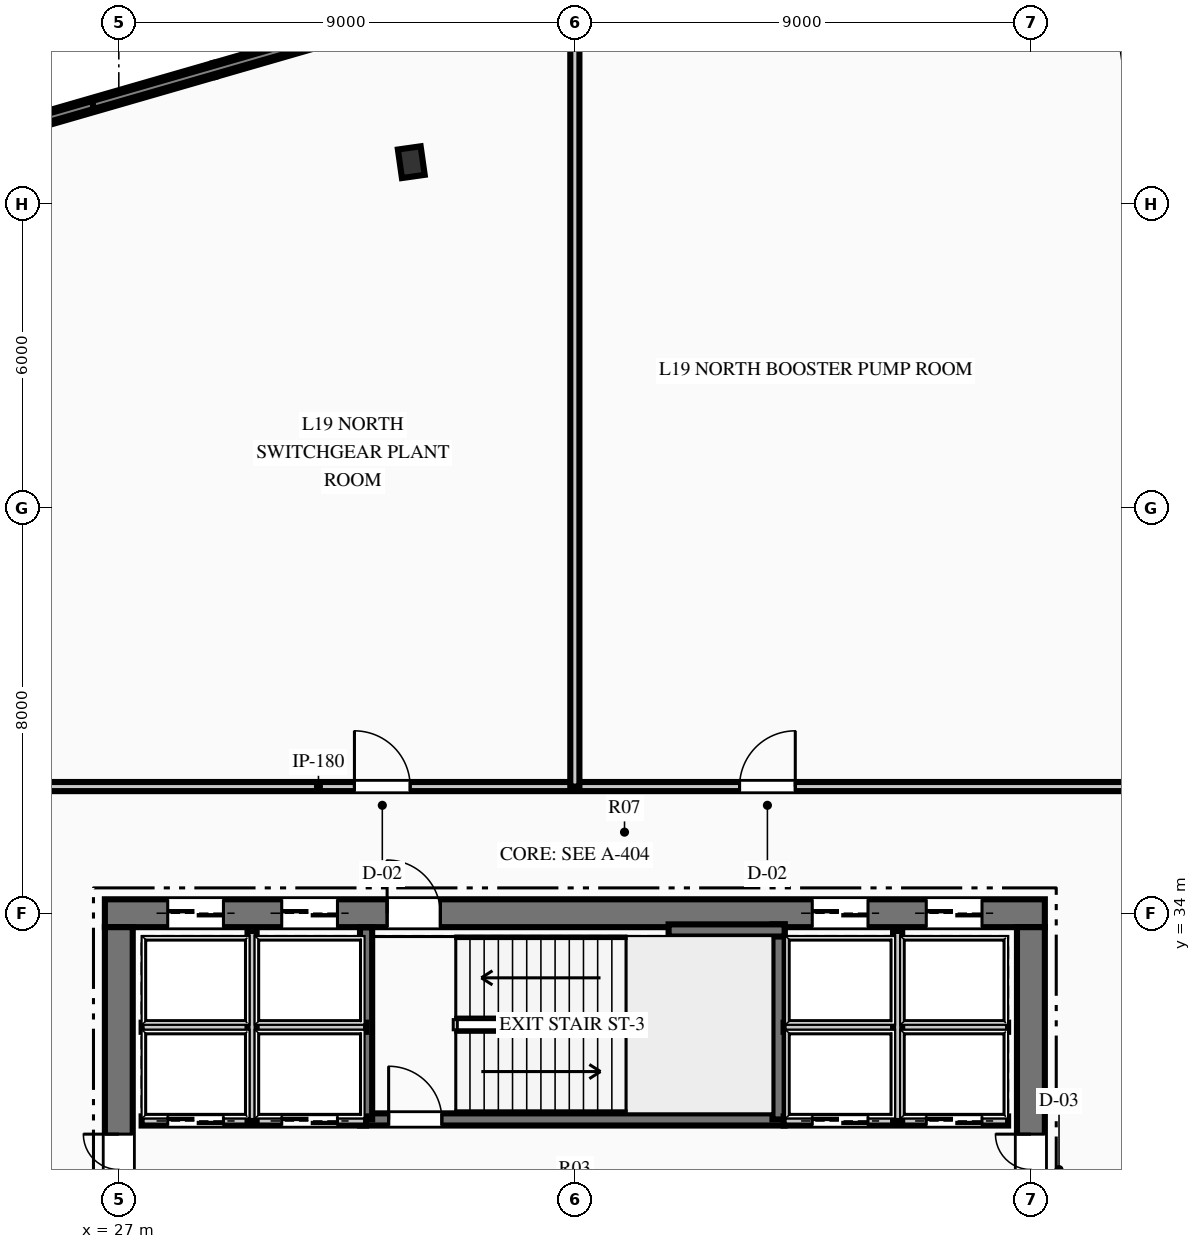
"""IFC4 building model, lengths in metres.
Left out: names, types, materials, properties, quantities, classifications, styles, units other than length and angle.
Written with IfcOpenShell. Run it as: python <this file> out.ifc"""

import sys

from ifc_helpers import new_model, si_unit, direction, frame, frame_2d, origin, origin_2d, place, context, subcontext, project, spatial, rectangle, i_section, extrude, element, fill, save


model = new_model("IFC4")
c1 = context("Model", 3, precision=1e-05, world=origin(), true_north=direction((0.0, 1.0)))
c2 = subcontext(c1, "Body", "Model", "MODEL_VIEW")
j1 = project(units=[si_unit("LENGTHUNIT", "METRE"), si_unit("PLANEANGLEUNIT", "RADIAN")], contexts=[c1])
p1 = place(None, origin())
s1 = spatial("IfcSite", under=j1, at=p1, CompositionType="ELEMENT")
p2 = place(p1, origin())
s2 = spatial("IfcBuilding", under=s1, at=p2, CompositionType="ELEMENT")
p3 = place(p2, frame((0.0, 0.0, 81.45)))
s3 = spatial("IfcBuildingStorey", under=s2, at=p3, CompositionType="ELEMENT", Elevation=81.45)
p4 = place(p3, frame((26.725, 34.0, 0.0), z_axis=(0.0, 0.0, 1.0), x_axis=(1.0, 0.0, 0.0)))
e1 = element("IfcWall", 1, at=p4, inside=s3, PredefinedType="SHEAR", context=c2, shape_type="SweptSolid", body=[
    extrude(rectangle(XDim=18.55, YDim=0.55, at=frame_2d((9.275, 0.0))), origin(), (0.0, 0.0, 1.0), 4.5),
])
p5 = place(p4, frame((5.57, 0.0, 0.0)))
e2 = element("IfcOpeningElement", 2, at=p5, cuts=e1, PredefinedType="OPENING", context=c2, shape_type="SweptSolid", body=[
    extrude(rectangle(XDim=1.05, YDim=2.15, at=frame_2d((0.525, 1.075))), frame((0.0, 0.285, 0.0), z_axis=(0.0, -1.0, 0.0), x_axis=(1.0, 0.0, 0.0)), (0.0, 0.0, 1.0), 0.57),
])
p6 = place(p4, frame((1.24, 0.0, 0.0)))
e3 = element("IfcOpeningElement", 3, at=p6, cuts=e1, PredefinedType="OPENING", context=c2, shape_type="SweptSolid", body=[
    extrude(rectangle(XDim=1.1, YDim=2.15, at=frame_2d((0.55, 1.075))), frame((0.0, 0.285, 0.0), z_axis=(0.0, -1.0, 0.0), x_axis=(1.0, 0.0, 0.0)), (0.0, 0.0, 1.0), 0.57),
])
p7 = place(p4, frame((3.49, 0.0, 0.0)))
e4 = element("IfcOpeningElement", 4, at=p7, cuts=e1, PredefinedType="OPENING", context=c2, shape_type="SweptSolid", body=[
    extrude(rectangle(XDim=1.1, YDim=2.15, at=frame_2d((0.55, 1.075))), frame((0.0, 0.285, 0.0), z_axis=(0.0, -1.0, 0.0), x_axis=(1.0, 0.0, 0.0)), (0.0, 0.0, 1.0), 0.57),
])
p8 = place(p4, frame((13.96, 0.0, 0.0)))
e5 = element("IfcOpeningElement", 5, at=p8, cuts=e1, PredefinedType="OPENING", context=c2, shape_type="SweptSolid", body=[
    extrude(rectangle(XDim=1.1, YDim=2.15, at=frame_2d((0.55, 1.075))), frame((0.0, 0.285, 0.0), z_axis=(0.0, -1.0, 0.0), x_axis=(1.0, 0.0, 0.0)), (0.0, 0.0, 1.0), 0.57),
])
p9 = place(p4, frame((16.21, 0.0, 0.0)))
e6 = element("IfcOpeningElement", 6, at=p9, cuts=e1, PredefinedType="OPENING", context=c2, shape_type="SweptSolid", body=[
    extrude(rectangle(XDim=1.1, YDim=2.15, at=frame_2d((0.55, 1.075))), frame((0.0, 0.285, 0.0), z_axis=(0.0, -1.0, 0.0), x_axis=(1.0, 0.0, 0.0)), (0.0, 0.0, 1.0), 0.57),
])
p10 = place(p3, frame((27.0, 18.275, 0.0), z_axis=(0.0, 0.0, 1.0), x_axis=(0.0, 1.0, 0.0)))
e7 = element("IfcWall", 7, at=p10, inside=s3, PredefinedType="SHEAR", context=c2, shape_type="SweptSolid", body=[
    extrude(rectangle(XDim=15.45, YDim=0.55, at=frame_2d((7.725, 0.0))), origin(), (0.0, 0.0, 1.0), 4.5),
])
p11 = place(p10, frame((9.965, 0.0, 0.0)))
e8 = element("IfcOpeningElement", 8, at=p11, cuts=e7, PredefinedType="OPENING", context=c2, shape_type="SweptSolid", body=[
    extrude(rectangle(XDim=1.4, YDim=2.2, at=frame_2d((0.7, 1.1))), frame((0.0, 0.285, 0.0), z_axis=(0.0, -1.0, 0.0), x_axis=(1.0, 0.0, 0.0)), (0.0, 0.0, 1.0), 0.57),
])
p12 = place(p3, frame((45.0, 18.275, 0.0), z_axis=(0.0, 0.0, 1.0), x_axis=(0.0, 1.0, 0.0)))
e9 = element("IfcWall", 9, at=p12, inside=s3, PredefinedType="SHEAR", context=c2, shape_type="SweptSolid", body=[
    extrude(rectangle(XDim=15.45, YDim=0.55, at=frame_2d((7.725, 0.0))), origin(), (0.0, 0.0, 1.0), 4.5),
])
p13 = place(p12, frame((9.965, 0.0, 0.0)))
e10 = element("IfcOpeningElement", 10, at=p13, cuts=e9, PredefinedType="OPENING", context=c2, shape_type="SweptSolid", body=[
    extrude(rectangle(XDim=1.4, YDim=2.2, at=frame_2d((0.7, 1.1))), frame((0.0, 0.285, 0.0), z_axis=(0.0, -1.0, 0.0), x_axis=(1.0, 0.0, 0.0)), (0.0, 0.0, 1.0), 0.57),
])
p14 = place(p3, frame((31.76, 29.93, 0.0), z_axis=(0.0, 0.0, 1.0), x_axis=(1.0, 0.0, 0.0)))
e11 = element("IfcWall", 11, at=p14, inside=s3, PredefinedType="SHEAR", context=c2, shape_type="SweptSolid", body=[
    extrude(rectangle(XDim=8.38, YDim=0.24, at=frame_2d((4.19, 0.0))), origin(), (0.0, 0.0, 1.0), 4.5),
])
p15 = place(p14, frame((0.565, 0.0, 0.0)))
e12 = element("IfcOpeningElement", 12, at=p15, cuts=e11, PredefinedType="OPENING", context=c2, shape_type="SweptSolid", body=[
    extrude(rectangle(XDim=1.05, YDim=2.15, at=frame_2d((0.525, 1.075))), frame((0.0, 0.13, 0.0), z_axis=(0.0, -1.0, 0.0), x_axis=(1.0, 0.0, 0.0)), (0.0, 0.0, 1.0), 0.26),
])
p16 = place(p3, frame((31.88, 29.93, 0.0), z_axis=(0.0, 0.0, 1.0), x_axis=(0.0, 1.0, 0.0)))
e13 = element("IfcWall", 13, at=p16, inside=s3, PredefinedType="SHEAR", context=c2, shape_type="SweptSolid", body=[
    extrude(rectangle(XDim=3.79, YDim=0.24, at=frame_2d((1.895, 0.0))), origin(), (0.0, 0.0, 1.0), 4.5),
])
p17 = place(p3, frame((40.02, 29.93, 0.0), z_axis=(0.0, 0.0, 1.0), x_axis=(0.0, 1.0, 0.0)))
e14 = element("IfcWall", 14, at=p17, inside=s3, PredefinedType="SHEAR", context=c2, shape_type="SweptSolid", body=[
    extrude(rectangle(XDim=3.85, YDim=0.24, at=frame_2d((1.925, 0.0))), origin(), (0.0, 0.0, 1.0), 4.5),
])
p18 = place(p3, frame((37.85, 33.66, 0.0), z_axis=(0.0, 0.0, 1.0), x_axis=(1.0, 0.0, 0.0)))
e15 = element("IfcWall", 15, at=p18, inside=s3, PredefinedType="SHEAR", context=c2, shape_type="SweptSolid", body=[
    extrude(rectangle(XDim=2.29, YDim=0.24, at=frame_2d((1.145, 0.0))), origin(), (0.0, 0.0, 1.0), 4.5),
])
p19 = place(p3, frame((32.772, 48.823, 0.0), z_axis=(0.0, 0.0, 1.0), x_axis=(0.990146240249, 0.140037219771, 0.0)))
e16 = element("IfcColumn", 16, at=p19, inside=s3, PredefinedType="COLUMN", context=c2, shape_type="SweptSolid", body=[
    extrude(i_section(OverallWidth=0.454, OverallDepth=0.569, WebThickness=0.078, FlangeThickness=0.125, at=origin_2d()), origin(), (0.0, 0.0, 1.0), 4.5),
])
p20 = place(p3, frame((7.317, 44.418, 0.0), z_axis=(0.0, 0.0, 1.0), x_axis=(0.960778077815, 0.277318382351, 0.0)))
e17 = element("IfcWall", 17, at=p20, inside=s3, PredefinedType="STANDARD", context=c2, shape_type="SweptSolid", body=[
    extrude(rectangle(XDim=22.45, YDim=0.28, at=frame_2d((11.225, 0.0))), origin(), (0.0, 0.0, 1.0), 1.15),
])
p21 = place(p3, frame((28.887, 50.644, 0.0), z_axis=(0.0, 0.0, 1.0), x_axis=(0.960780138982, 0.277311241274, 0.0)))
e18 = element("IfcWall", 18, at=p21, inside=s3, PredefinedType="STANDARD", context=c2, shape_type="SweptSolid", body=[
    extrude(rectangle(XDim=22.45, YDim=0.28, at=frame_2d((11.225, 0.0))), origin(), (0.0, 0.0, 1.0), 1.15),
])
p22 = place(p3, frame((27.45, 29.9, 0.0), z_axis=(0.0, 0.0, 1.0), x_axis=(1.0, 0.0, 0.0)))
e19 = element("IfcWall", 19, at=p22, inside=s3, PredefinedType="PARTITIONING", context=c2, shape_type="SweptSolid", body=[
    extrude(rectangle(XDim=4.43, YDim=0.18, at=frame_2d((2.215, 0.0))), origin(), (0.0, 0.0, 1.0), 4.09),
])
p23 = place(p22, frame((0.515, 0.0, 0.0)))
e20 = element("IfcOpeningElement", 20, at=p23, cuts=e19, PredefinedType="OPENING", context=c2, shape_type="SweptSolid", body=[
    extrude(rectangle(XDim=1.1, YDim=2.15, at=frame_2d((0.55, 1.075))), frame((0.0, 0.1, 0.0), z_axis=(0.0, -1.0, 0.0), x_axis=(1.0, 0.0, 0.0)), (0.0, 0.0, 1.0), 0.2),
])
p24 = place(p22, frame((2.765, 0.0, 0.0)))
e21 = element("IfcOpeningElement", 21, at=p24, cuts=e19, PredefinedType="OPENING", context=c2, shape_type="SweptSolid", body=[
    extrude(rectangle(XDim=1.1, YDim=2.15, at=frame_2d((0.55, 1.075))), frame((0.0, 0.1, 0.0), z_axis=(0.0, -1.0, 0.0), x_axis=(1.0, 0.0, 0.0)), (0.0, 0.0, 1.0), 0.2),
])
p25 = place(p3, frame((27.45, 31.75, 0.0), z_axis=(0.0, 0.0, 1.0), x_axis=(1.0, 0.0, 0.0)))
e22 = element("IfcWall", 22, at=p25, inside=s3, PredefinedType="PARTITIONING", context=c2, shape_type="SweptSolid", body=[
    extrude(rectangle(XDim=4.43, YDim=0.18, at=frame_2d((2.215, 0.0))), origin(), (0.0, 0.0, 1.0), 4.09),
])
p26 = place(p3, frame((29.63, 29.9, 0.0), z_axis=(0.0, 0.0, 1.0), x_axis=(0.0, 1.0, 0.0)))
e23 = element("IfcWall", 23, at=p26, inside=s3, PredefinedType="PARTITIONING", context=c2, shape_type="SweptSolid", body=[
    extrude(rectangle(XDim=3.75, YDim=0.18, at=frame_2d((1.875, 0.0))), origin(), (0.0, 0.0, 1.0), 4.09),
])
p27 = place(p3, frame((40.12, 29.9, 0.0), z_axis=(0.0, 0.0, 1.0), x_axis=(1.0, 0.0, 0.0)))
e24 = element("IfcWall", 24, at=p27, inside=s3, PredefinedType="PARTITIONING", context=c2, shape_type="SweptSolid", body=[
    extrude(rectangle(XDim=4.43, YDim=0.18, at=frame_2d((2.215, 0.0))), origin(), (0.0, 0.0, 1.0), 4.09),
])
p28 = place(p27, frame((0.565, 0.0, 0.0)))
e25 = element("IfcOpeningElement", 25, at=p28, cuts=e24, PredefinedType="OPENING", context=c2, shape_type="SweptSolid", body=[
    extrude(rectangle(XDim=1.1, YDim=2.15, at=frame_2d((0.55, 1.075))), frame((0.0, 0.1, 0.0), z_axis=(0.0, -1.0, 0.0), x_axis=(1.0, 0.0, 0.0)), (0.0, 0.0, 1.0), 0.2),
])
p29 = place(p27, frame((2.815, 0.0, 0.0)))
e26 = element("IfcOpeningElement", 26, at=p29, cuts=e24, PredefinedType="OPENING", context=c2, shape_type="SweptSolid", body=[
    extrude(rectangle(XDim=1.1, YDim=2.15, at=frame_2d((0.55, 1.075))), frame((0.0, 0.1, 0.0), z_axis=(0.0, -1.0, 0.0), x_axis=(1.0, 0.0, 0.0)), (0.0, 0.0, 1.0), 0.2),
])
p30 = place(p3, frame((40.12, 31.75, 0.0), z_axis=(0.0, 0.0, 1.0), x_axis=(1.0, 0.0, 0.0)))
e27 = element("IfcWall", 27, at=p30, inside=s3, PredefinedType="PARTITIONING", context=c2, shape_type="SweptSolid", body=[
    extrude(rectangle(XDim=4.43, YDim=0.18, at=frame_2d((2.215, 0.0))), origin(), (0.0, 0.0, 1.0), 4.09),
])
p31 = place(p3, frame((42.37, 29.9, 0.0), z_axis=(0.0, 0.0, 1.0), x_axis=(0.0, 1.0, 0.0)))
e28 = element("IfcWall", 28, at=p31, inside=s3, PredefinedType="PARTITIONING", context=c2, shape_type="SweptSolid", body=[
    extrude(rectangle(XDim=3.75, YDim=0.18, at=frame_2d((1.875, 0.0))), origin(), (0.0, 0.0, 1.0), 4.09),
])
p32 = place(p3, frame((24.5, 36.5, 0.0), z_axis=(0.0, 0.0, 1.0), x_axis=(1.0, 0.0, 0.0)))
e29 = element("IfcWall", 29, at=p32, inside=s3, PredefinedType="PARTITIONING", context=c2, shape_type="SweptSolid", body=[
    extrude(rectangle(XDim=23.0, YDim=0.18, at=frame_2d((11.5, 0.0))), origin(), (0.0, 0.0, 1.0), 4.09),
])
p33 = place(p32, frame((7.15, 0.0, 0.0)))
e30 = element("IfcOpeningElement", 30, at=p33, cuts=e29, PredefinedType="OPENING", context=c2, shape_type="SweptSolid", body=[
    extrude(rectangle(XDim=1.1, YDim=2.15, at=frame_2d((0.55, 1.075))), frame((0.0, 0.1, 0.0), z_axis=(0.0, -1.0, 0.0), x_axis=(1.0, 0.0, 0.0)), (0.0, 0.0, 1.0), 0.2),
])
p34 = place(p32, frame((14.75, 0.0, 0.0)))
e31 = element("IfcOpeningElement", 31, at=p34, cuts=e29, PredefinedType="OPENING", context=c2, shape_type="SweptSolid", body=[
    extrude(rectangle(XDim=1.1, YDim=2.15, at=frame_2d((0.55, 1.075))), frame((0.0, 0.1, 0.0), z_axis=(0.0, -1.0, 0.0), x_axis=(1.0, 0.0, 0.0)), (0.0, 0.0, 1.0), 0.2),
])
p35 = place(p3, frame((36.0, 36.5, 0.0), z_axis=(0.0, 0.0, 1.0), x_axis=(0.0, 1.0, 0.0)))
e32 = element("IfcWall", 32, at=p35, inside=s3, PredefinedType="PARTITIONING", context=c2, shape_type="SweptSolid", body=[
    extrude(rectangle(XDim=16.156, YDim=0.18, at=frame_2d((8.078, 0.0))), origin(), (0.0, 0.0, 1.0), 4.09),
])
p36 = place(p15, origin())
e33 = element("IfcDoor", 33, at=p36, inside=s3, OperationType="SINGLE_SWING_LEFT", PredefinedType="DOOR", context=c2, shape_type="SweptSolid", body=[
    extrude(rectangle(XDim=1.05, YDim=2.15, at=frame_2d((0.525, 1.075))), frame((0.0, 0.025, 0.0), z_axis=(0.0, -1.0, 0.0), x_axis=(1.0, 0.0, 0.0)), (0.0, 0.0, 1.0), 0.05),
])
fill(e12, e33)
p37 = place(p11, origin())
e34 = element("IfcDoor", 34, at=p37, inside=s3, OperationType="DOUBLE_DOOR_SINGLE_SWING", PredefinedType="DOOR", context=c2, shape_type="SweptSolid", body=[
    extrude(rectangle(XDim=1.4, YDim=2.2, at=frame_2d((0.7, 1.1))), frame((0.0, 0.025, 0.0), z_axis=(0.0, -1.0, 0.0), x_axis=(1.0, 0.0, 0.0)), (0.0, 0.0, 1.0), 0.05),
])
fill(e8, e34)
p38 = place(p13, origin())
e35 = element("IfcDoor", 35, at=p38, inside=s3, OperationType="DOUBLE_DOOR_SINGLE_SWING", PredefinedType="DOOR", context=c2, shape_type="SweptSolid", body=[
    extrude(rectangle(XDim=1.4, YDim=2.2, at=frame_2d((0.7, 1.1))), frame((0.0, 0.025, 0.0), z_axis=(0.0, -1.0, 0.0), x_axis=(1.0, 0.0, 0.0)), (0.0, 0.0, 1.0), 0.05),
])
fill(e10, e35)
p39 = place(p33, origin())
e36 = element("IfcDoor", 36, at=p39, inside=s3, OperationType="SINGLE_SWING_LEFT", PredefinedType="DOOR", context=c2, shape_type="SweptSolid", body=[
    extrude(rectangle(XDim=1.1, YDim=2.15, at=frame_2d((0.55, 1.075))), frame((0.0, 0.025, 0.0), z_axis=(0.0, -1.0, 0.0), x_axis=(1.0, 0.0, 0.0)), (0.0, 0.0, 1.0), 0.05),
])
fill(e30, e36)
p40 = place(p34, origin())
e37 = element("IfcDoor", 37, at=p40, inside=s3, OperationType="SINGLE_SWING_RIGHT", PredefinedType="DOOR", context=c2, shape_type="SweptSolid", body=[
    extrude(rectangle(XDim=1.1, YDim=2.15, at=frame_2d((0.55, 1.075))), frame((0.0, 0.025, 0.0), z_axis=(0.0, -1.0, 0.0), x_axis=(1.0, 0.0, 0.0)), (0.0, 0.0, 1.0), 0.05),
])
fill(e31, e37)
p41 = place(p5, origin())
e38 = element("IfcDoor", 38, at=p41, inside=s3, OperationType="SINGLE_SWING_LEFT", PredefinedType="DOOR", context=c2, shape_type="SweptSolid", body=[
    extrude(rectangle(XDim=1.05, YDim=2.15, at=frame_2d((0.525, 1.075))), frame((0.0, 0.025, 0.0), z_axis=(0.0, -1.0, 0.0), x_axis=(1.0, 0.0, 0.0)), (0.0, 0.0, 1.0), 0.05),
])
fill(e2, e38)
p42 = place(p23, origin())
e39 = element("IfcDoor", 39, at=p42, inside=s3, OperationType="SLIDING_TO_LEFT", PredefinedType="DOOR", context=c2, shape_type="SweptSolid", body=[
    extrude(rectangle(XDim=1.1, YDim=2.15, at=frame_2d((0.55, 1.075))), frame((0.0, 0.025, 0.0), z_axis=(0.0, -1.0, 0.0), x_axis=(1.0, 0.0, 0.0)), (0.0, 0.0, 1.0), 0.05),
])
fill(e20, e39)
p43 = place(p24, origin())
e40 = element("IfcDoor", 40, at=p43, inside=s3, OperationType="SLIDING_TO_LEFT", PredefinedType="DOOR", context=c2, shape_type="SweptSolid", body=[
    extrude(rectangle(XDim=1.1, YDim=2.15, at=frame_2d((0.55, 1.075))), frame((0.0, 0.025, 0.0), z_axis=(0.0, -1.0, 0.0), x_axis=(1.0, 0.0, 0.0)), (0.0, 0.0, 1.0), 0.05),
])
fill(e21, e40)
p44 = place(p6, origin())
e41 = element("IfcDoor", 41, at=p44, inside=s3, OperationType="SLIDING_TO_LEFT", PredefinedType="DOOR", context=c2, shape_type="SweptSolid", body=[
    extrude(rectangle(XDim=1.1, YDim=2.15, at=frame_2d((0.55, 1.075))), frame((0.0, 0.025, 0.0), z_axis=(0.0, -1.0, 0.0), x_axis=(1.0, 0.0, 0.0)), (0.0, 0.0, 1.0), 0.05),
])
fill(e3, e41)
p45 = place(p7, origin())
e42 = element("IfcDoor", 42, at=p45, inside=s3, OperationType="SLIDING_TO_LEFT", PredefinedType="DOOR", context=c2, shape_type="SweptSolid", body=[
    extrude(rectangle(XDim=1.1, YDim=2.15, at=frame_2d((0.55, 1.075))), frame((0.0, 0.025, 0.0), z_axis=(0.0, -1.0, 0.0), x_axis=(1.0, 0.0, 0.0)), (0.0, 0.0, 1.0), 0.05),
])
fill(e4, e42)
p46 = place(p28, origin())
e43 = element("IfcDoor", 43, at=p46, inside=s3, OperationType="SLIDING_TO_LEFT", PredefinedType="DOOR", context=c2, shape_type="SweptSolid", body=[
    extrude(rectangle(XDim=1.1, YDim=2.15, at=frame_2d((0.55, 1.075))), frame((0.0, 0.025, 0.0), z_axis=(0.0, -1.0, 0.0), x_axis=(1.0, 0.0, 0.0)), (0.0, 0.0, 1.0), 0.05),
])
fill(e25, e43)
p47 = place(p29, origin())
e44 = element("IfcDoor", 44, at=p47, inside=s3, OperationType="SLIDING_TO_LEFT", PredefinedType="DOOR", context=c2, shape_type="SweptSolid", body=[
    extrude(rectangle(XDim=1.1, YDim=2.15, at=frame_2d((0.55, 1.075))), frame((0.0, 0.025, 0.0), z_axis=(0.0, -1.0, 0.0), x_axis=(1.0, 0.0, 0.0)), (0.0, 0.0, 1.0), 0.05),
])
fill(e26, e44)
p48 = place(p8, origin())
e45 = element("IfcDoor", 45, at=p48, inside=s3, OperationType="SLIDING_TO_LEFT", PredefinedType="DOOR", context=c2, shape_type="SweptSolid", body=[
    extrude(rectangle(XDim=1.1, YDim=2.15, at=frame_2d((0.55, 1.075))), frame((0.0, 0.025, 0.0), z_axis=(0.0, -1.0, 0.0), x_axis=(1.0, 0.0, 0.0)), (0.0, 0.0, 1.0), 0.05),
])
fill(e5, e45)
p49 = place(p9, origin())
e46 = element("IfcDoor", 46, at=p49, inside=s3, OperationType="SLIDING_TO_LEFT", PredefinedType="DOOR", context=c2, shape_type="SweptSolid", body=[
    extrude(rectangle(XDim=1.1, YDim=2.15, at=frame_2d((0.55, 1.075))), frame((0.0, 0.025, 0.0), z_axis=(0.0, -1.0, 0.0), x_axis=(1.0, 0.0, 0.0)), (0.0, 0.0, 1.0), 0.05),
])
fill(e6, e46)
save(model, sys.argv[1])
